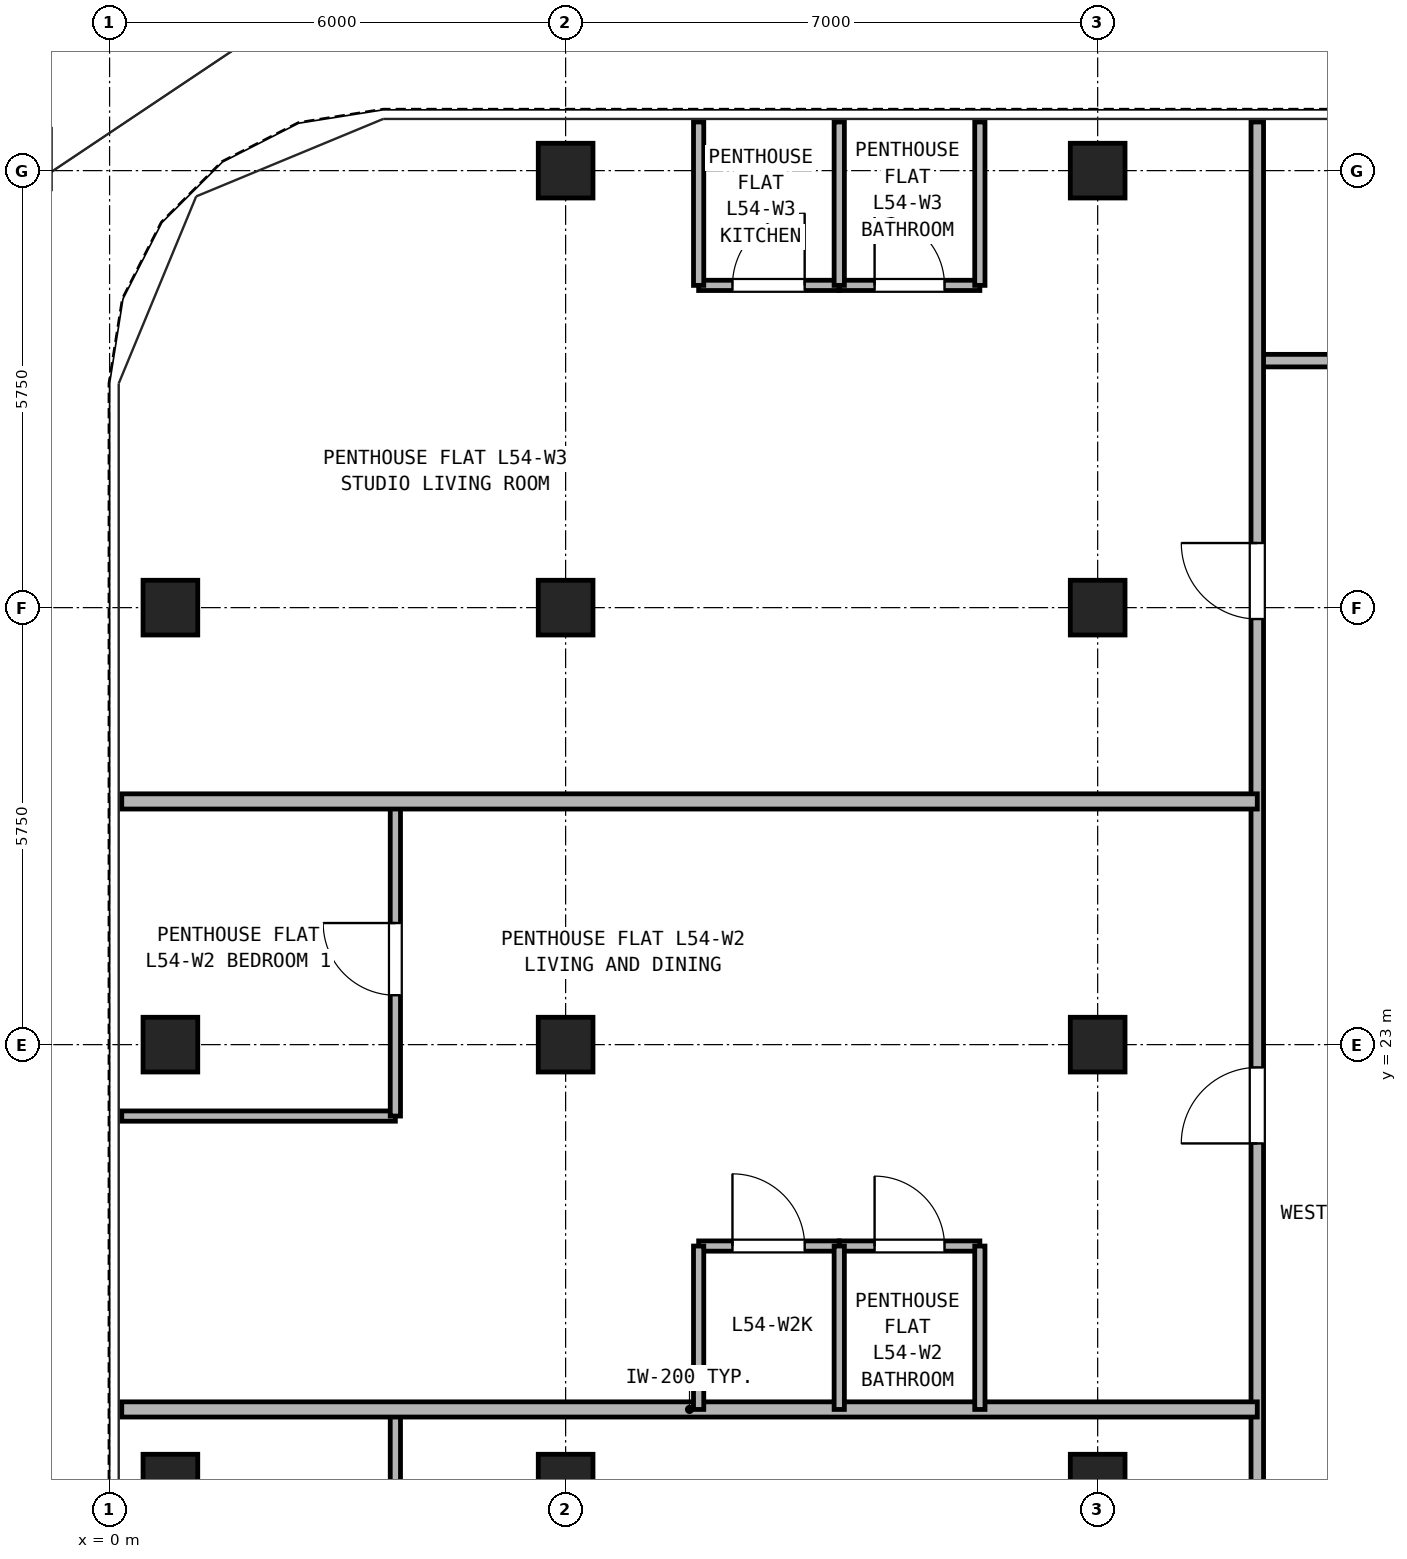
"""IFC4 building model, lengths in metres.
Left out: names, types, materials, properties, quantities, classifications, styles, units other than length and angle.
Written with IfcOpenShell. Run it as: python <this file> out.ifc"""

import sys

from ifc_helpers import new_model, si_unit, direction, frame, frame_2d, origin, origin_2d, place, context, subcontext, project, spatial, rectangle, hollow_rectangle, extrude, source, transform, mapped, element, fill, save


model = new_model("IFC4")
c1 = context("Model", 3, precision=1e-05, world=origin(), true_north=direction((0.0, 1.0)))
c2 = subcontext(c1, "Body", "Model", "MODEL_VIEW")
j1 = project(units=[si_unit("LENGTHUNIT", "METRE"), si_unit("PLANEANGLEUNIT", "RADIAN")], contexts=[c1])
p1 = place(None, origin())
s1 = spatial("IfcSite", under=j1, at=p1, CompositionType="ELEMENT")
p2 = place(p1, origin())
s2 = spatial("IfcBuilding", under=s1, at=p2, CompositionType="ELEMENT")
p3 = place(p2, frame((0.0, 0.0, 193.2)))
s3 = spatial("IfcBuildingStorey", under=s2, at=p3, CompositionType="ELEMENT", Elevation=193.2)
m1 = source(origin(), c2, "Body", "SweptSolid", [
    extrude(hollow_rectangle(XDim=0.72, YDim=0.72, WallThickness=0.04, at=origin_2d()), origin(), (0.0, 0.0, 1.0), 2.95),
])
for number, where, z_axis, x_axis in (
    (1, (6.0, 34.5, 0.0), (0.0, 0.0, 1.0), (1.0, 0.0, 0.0)),
    (2, (13.0, 34.5, 0.0), (0.0, 0.0, 1.0), (1.0, 0.0, 0.0)),
    (3, (0.8, 17.25, 0.0), (0.0, 0.0, 1.0), (1.0, 0.0, 0.0)),
    (4, (0.8, 23.0, 0.0), (0.0, 0.0, 1.0), (1.0, 0.0, 0.0)),
    (5, (0.8, 28.75, 0.0), (0.0, 0.0, 1.0), (1.0, 0.0, 0.0)),
    (6, (6.0, 17.25, 0.0), (0.0, 0.0, 1.0), (1.0, 0.0, 0.0)),
    (7, (6.0, 23.0, 0.0), (0.0, 0.0, 1.0), (1.0, 0.0, 0.0)),
    (8, (6.0, 28.75, 0.0), (0.0, 0.0, 1.0), (1.0, 0.0, 0.0)),
    (9, (13.0, 17.25, 0.0), (0.0, 0.0, 1.0), (1.0, 0.0, 0.0)),
    (10, (13.0, 23.0, 0.0), (0.0, 0.0, 1.0), (1.0, 0.0, 0.0)),
    (11, (13.0, 28.75, 0.0), (0.0, 0.0, 1.0), (1.0, 0.0, 0.0)),
):
    element("IfcColumn", number, at=place(p3, frame(where, z_axis=z_axis, x_axis=x_axis)), inside=s3, PredefinedType="COLUMN", context=c2, shape_type="MappedRepresentation", body=[
        mapped(m1, transform((0.0, 0.0, 0.0), x_axis=(1.0, 0.0, 0.0), y_axis=(0.0, 1.0, 0.0), z_axis=(0.0, 0.0, 1.0), scale=1.0)),
    ])
p4 = place(p3, frame((15.1, 32.0, 0.0), z_axis=(0.0, 0.0, 1.0), x_axis=(1.0, 0.0, 0.0)))
e12 = element("IfcWall", 12, at=p4, inside=s3, PredefinedType="PARTITIONING", context=c2, shape_type="SweptSolid", body=[
    extrude(rectangle(XDim=16.8, YDim=0.165, at=frame_2d((8.4, 0.0))), origin(), (0.0, 0.0, 1.0), 2.95),
])
p5 = place(p4, frame((2.7, 0.0, 0.0)))
e13 = element("IfcOpeningElement", 13, at=p5, cuts=e12, PredefinedType="OPENING", context=c2, shape_type="SweptSolid", body=[
    extrude(rectangle(XDim=0.95, YDim=2.15, at=frame_2d((0.475, 1.075))), frame((0.0, 0.093, 0.0), z_axis=(0.0, -1.0, 0.0), x_axis=(1.0, 0.0, 0.0)), (0.0, 0.0, 1.0), 0.185),
])
p6 = place(p4, frame((8.1, 0.0, 0.0)))
e14 = element("IfcOpeningElement", 14, at=p6, cuts=e12, PredefinedType="OPENING", context=c2, shape_type="SweptSolid", body=[
    extrude(rectangle(XDim=0.95, YDim=2.15, at=frame_2d((0.475, 1.075))), frame((0.0, 0.093, 0.0), z_axis=(0.0, -1.0, 0.0), x_axis=(1.0, 0.0, 0.0)), (0.0, 0.0, 1.0), 0.185),
])
p7 = place(p4, frame((13.3, 0.0, 0.0)))
e15 = element("IfcOpeningElement", 15, at=p7, cuts=e12, PredefinedType="OPENING", context=c2, shape_type="SweptSolid", body=[
    extrude(rectangle(XDim=0.92, YDim=2.1, at=frame_2d((0.46, 1.05))), frame((0.0, 0.093, 0.0), z_axis=(0.0, -1.0, 0.0), x_axis=(1.0, 0.0, 0.0)), (0.0, 0.0, 1.0), 0.185),
])
p8 = place(p3, frame((15.1, 10.6, 0.0), z_axis=(0.0, 0.0, 1.0), x_axis=(0.0, 1.0, 0.0)))
e16 = element("IfcWall", 16, at=p8, inside=s3, PredefinedType="PARTITIONING", context=c2, shape_type="SweptSolid", body=[
    extrude(rectangle(XDim=24.54, YDim=0.165, at=frame_2d((12.27, 0.0))), origin(), (0.0, 0.0, 1.0), 2.95),
])
p9 = place(p8, frame((3.3, 0.0, 0.0)))
e17 = element("IfcOpeningElement", 17, at=p9, cuts=e16, PredefinedType="OPENING", context=c2, shape_type="SweptSolid", body=[
    extrude(rectangle(XDim=1.0, YDim=2.15, at=frame_2d((0.5, 1.075))), frame((0.0, 0.093, 0.0), z_axis=(0.0, -1.0, 0.0), x_axis=(1.0, 0.0, 0.0)), (0.0, 0.0, 1.0), 0.185),
])
p10 = place(p8, frame((11.1, 0.0, 0.0)))
e18 = element("IfcOpeningElement", 18, at=p10, cuts=e16, PredefinedType="OPENING", context=c2, shape_type="SweptSolid", body=[
    extrude(rectangle(XDim=1.0, YDim=2.15, at=frame_2d((0.5, 1.075))), frame((0.0, 0.093, 0.0), z_axis=(0.0, -1.0, 0.0), x_axis=(1.0, 0.0, 0.0)), (0.0, 0.0, 1.0), 0.185),
])
p11 = place(p8, frame((18.0, 0.0, 0.0)))
e19 = element("IfcOpeningElement", 19, at=p11, cuts=e16, PredefinedType="OPENING", context=c2, shape_type="SweptSolid", body=[
    extrude(rectangle(XDim=1.0, YDim=2.15, at=frame_2d((0.5, 1.075))), frame((0.0, 0.093, 0.0), z_axis=(0.0, -1.0, 0.0), x_axis=(1.0, 0.0, 0.0)), (0.0, 0.0, 1.0), 0.185),
])
p12 = place(p3, frame((3.76, 14.348, 0.0), z_axis=(0.0, 0.0, 1.0), x_axis=(0.0, 1.0, 0.0)))
e20 = element("IfcWall", 20, at=p12, inside=s3, PredefinedType="PARTITIONING", context=c2, shape_type="SweptSolid", body=[
    extrude(rectangle(XDim=3.852, YDim=0.135, at=frame_2d((1.926, 0.0))), origin(), (0.0, 0.0, 1.0), 2.95),
])
p13 = place(p12, frame((1.446, 0.0, 0.0)))
e21 = element("IfcOpeningElement", 21, at=p13, cuts=e20, PredefinedType="OPENING", context=c2, shape_type="SweptSolid", body=[
    extrude(rectangle(XDim=0.95, YDim=2.15, at=frame_2d((0.475, 1.075))), frame((0.0, 0.077, 0.0), z_axis=(0.0, -1.0, 0.0), x_axis=(1.0, 0.0, 0.0)), (0.0, 0.0, 1.0), 0.155),
])
p14 = place(p3, frame((0.16, 18.2, 0.0), z_axis=(0.0, 0.0, 1.0), x_axis=(1.0, 0.0, 0.0)))
e22 = element("IfcWall", 22, at=p14, inside=s3, PredefinedType="PARTITIONING", context=c2, shape_type="SweptSolid", body=[
    extrude(rectangle(XDim=14.94, YDim=0.2, at=frame_2d((7.47, 0.0))), origin(), (0.0, 0.0, 1.0), 2.95),
])
p15 = place(p3, frame((7.75, 20.35, 0.0), z_axis=(0.0, 0.0, 1.0), x_axis=(1.0, 0.0, 0.0)))
e23 = element("IfcWall", 23, at=p15, inside=s3, PredefinedType="PARTITIONING", context=c2, shape_type="SweptSolid", body=[
    extrude(rectangle(XDim=1.85, YDim=0.135, at=frame_2d((0.925, 0.0))), origin(), (0.0, 0.0, 1.0), 2.583),
])
p16 = place(p15, frame((0.445, 0.0, 0.0)))
e24 = element("IfcOpeningElement", 24, at=p16, cuts=e23, PredefinedType="OPENING", context=c2, shape_type="SweptSolid", body=[
    extrude(rectangle(XDim=0.95, YDim=2.15, at=frame_2d((0.475, 1.075))), frame((0.0, 0.077, 0.0), z_axis=(0.0, -1.0, 0.0), x_axis=(1.0, 0.0, 0.0)), (0.0, 0.0, 1.0), 0.155),
])
p17 = place(p3, frame((9.6, 20.35, 0.0), z_axis=(0.0, 0.0, 1.0), x_axis=(1.0, 0.0, 0.0)))
e25 = element("IfcWall", 25, at=p17, inside=s3, PredefinedType="PARTITIONING", context=c2, shape_type="SweptSolid", body=[
    extrude(rectangle(XDim=1.85, YDim=0.135, at=frame_2d((0.925, 0.0))), origin(), (0.0, 0.0, 1.0), 2.583),
])
p18 = place(p17, frame((0.465, 0.0, 0.0)))
e26 = element("IfcOpeningElement", 26, at=p18, cuts=e25, PredefinedType="OPENING", context=c2, shape_type="SweptSolid", body=[
    extrude(rectangle(XDim=0.92, YDim=2.1, at=frame_2d((0.46, 1.05))), frame((0.0, 0.077, 0.0), z_axis=(0.0, -1.0, 0.0), x_axis=(1.0, 0.0, 0.0)), (0.0, 0.0, 1.0), 0.155),
])
for number, where, z_axis, x_axis in (
    (27, (7.75, 18.2, 0.0), (0.0, 0.0, 1.0), (0.0, 1.0, 0.0)),
    (28, (9.6, 18.2, 0.0), (0.0, 0.0, 1.0), (0.0, 1.0, 0.0)),
    (29, (11.45, 18.2, 0.0), (0.0, 0.0, 1.0), (0.0, 1.0, 0.0)),
):
    element("IfcWall", number, at=place(p3, frame(where, z_axis=z_axis, x_axis=x_axis)), inside=s3, PredefinedType="PARTITIONING", context=c2, shape_type="SweptSolid", body=[
        extrude(rectangle(XDim=2.15, YDim=0.135, at=frame_2d((1.075, 0.0))), origin(), (0.0, 0.0, 1.0), 2.95),
    ])
p19 = place(p3, frame((0.16, 22.06, 0.0), z_axis=(0.0, 0.0, 1.0), x_axis=(1.0, 0.0, 0.0)))
e30 = element("IfcWall", 30, at=p19, inside=s3, PredefinedType="PARTITIONING", context=c2, shape_type="SweptSolid", body=[
    extrude(rectangle(XDim=3.6, YDim=0.135, at=frame_2d((1.8, 0.0))), origin(), (0.0, 0.0, 1.0), 2.95),
])
p20 = place(p3, frame((3.76, 22.06, 0.0), z_axis=(0.0, 0.0, 1.0), x_axis=(0.0, 1.0, 0.0)))
e31 = element("IfcWall", 31, at=p20, inside=s3, PredefinedType="PARTITIONING", context=c2, shape_type="SweptSolid", body=[
    extrude(rectangle(XDim=4.14, YDim=0.135, at=frame_2d((2.07, 0.0))), origin(), (0.0, 0.0, 1.0), 2.95),
])
p21 = place(p20, frame((1.59, 0.0, 0.0)))
e32 = element("IfcOpeningElement", 32, at=p21, cuts=e31, PredefinedType="OPENING", context=c2, shape_type="SweptSolid", body=[
    extrude(rectangle(XDim=0.95, YDim=2.15, at=frame_2d((0.475, 1.075))), frame((0.0, 0.077, 0.0), z_axis=(0.0, -1.0, 0.0), x_axis=(1.0, 0.0, 0.0)), (0.0, 0.0, 1.0), 0.155),
])
p22 = place(p3, frame((0.16, 26.2, 0.0), z_axis=(0.0, 0.0, 1.0), x_axis=(1.0, 0.0, 0.0)))
e33 = element("IfcWall", 33, at=p22, inside=s3, PredefinedType="PARTITIONING", context=c2, shape_type="SweptSolid", body=[
    extrude(rectangle(XDim=14.94, YDim=0.2, at=frame_2d((7.47, 0.0))), origin(), (0.0, 0.0, 1.0), 2.95),
])
p23 = place(p3, frame((7.75, 32.99, 0.0), z_axis=(0.0, 0.0, 1.0), x_axis=(1.0, 0.0, 0.0)))
e34 = element("IfcWall", 34, at=p23, inside=s3, PredefinedType="PARTITIONING", context=c2, shape_type="SweptSolid", body=[
    extrude(rectangle(XDim=1.85, YDim=0.135, at=frame_2d((0.925, 0.0))), origin(), (0.0, 0.0, 1.0), 2.95),
])
p24 = place(p23, frame((0.445, 0.0, 0.0)))
e35 = element("IfcOpeningElement", 35, at=p24, cuts=e34, PredefinedType="OPENING", context=c2, shape_type="SweptSolid", body=[
    extrude(rectangle(XDim=0.95, YDim=2.15, at=frame_2d((0.475, 1.075))), frame((0.0, 0.077, 0.0), z_axis=(0.0, -1.0, 0.0), x_axis=(1.0, 0.0, 0.0)), (0.0, 0.0, 1.0), 0.155),
])
p25 = place(p3, frame((9.6, 32.99, 0.0), z_axis=(0.0, 0.0, 1.0), x_axis=(1.0, 0.0, 0.0)))
e36 = element("IfcWall", 36, at=p25, inside=s3, PredefinedType="PARTITIONING", context=c2, shape_type="SweptSolid", body=[
    extrude(rectangle(XDim=1.85, YDim=0.135, at=frame_2d((0.925, 0.0))), origin(), (0.0, 0.0, 1.0), 2.95),
])
p26 = place(p25, frame((0.465, 0.0, 0.0)))
e37 = element("IfcOpeningElement", 37, at=p26, cuts=e36, PredefinedType="OPENING", context=c2, shape_type="SweptSolid", body=[
    extrude(rectangle(XDim=0.92, YDim=2.1, at=frame_2d((0.46, 1.05))), frame((0.0, 0.077, 0.0), z_axis=(0.0, -1.0, 0.0), x_axis=(1.0, 0.0, 0.0)), (0.0, 0.0, 1.0), 0.155),
])
for number, where, z_axis, x_axis in (
    (38, (7.75, 32.99, 0.0), (0.0, 0.0, 1.0), (0.0, 1.0, 0.0)),
    (39, (9.6, 32.99, 0.0), (0.0, 0.0, 1.0), (0.0, 1.0, 0.0)),
    (40, (11.45, 32.99, 0.0), (0.0, 0.0, 1.0), (0.0, 1.0, 0.0)),
):
    element("IfcWall", number, at=place(p3, frame(where, z_axis=z_axis, x_axis=x_axis)), inside=s3, PredefinedType="PARTITIONING", context=c2, shape_type="SweptSolid", body=[
        extrude(rectangle(XDim=2.15, YDim=0.135, at=frame_2d((1.075, 0.0))), origin(), (0.0, 0.0, 1.0), 2.95),
    ])
p27 = place(p16, origin())
e41 = element("IfcDoor", 41, at=p27, inside=s3, OperationType="SINGLE_SWING_LEFT", PredefinedType="DOOR", context=c2, shape_type="SweptSolid", body=[
    extrude(rectangle(XDim=0.95, YDim=2.15, at=frame_2d((0.475, 1.075))), frame((0.0, 0.025, 0.0), z_axis=(0.0, -1.0, 0.0), x_axis=(1.0, 0.0, 0.0)), (0.0, 0.0, 1.0), 0.05),
])
fill(e24, e41)
p28 = place(p18, origin())
e42 = element("IfcDoor", 42, at=p28, inside=s3, OperationType="SINGLE_SWING_LEFT", PredefinedType="DOOR", context=c2, shape_type="SweptSolid", body=[
    extrude(rectangle(XDim=0.92, YDim=2.1, at=frame_2d((0.46, 1.05))), frame((0.0, 0.025, 0.0), z_axis=(0.0, -1.0, 0.0), x_axis=(1.0, 0.0, 0.0)), (0.0, 0.0, 1.0), 0.05),
])
fill(e26, e42)
p29 = place(p21, origin())
e43 = element("IfcDoor", 43, at=p29, inside=s3, OperationType="SINGLE_SWING_RIGHT", PredefinedType="DOOR", context=c2, shape_type="SweptSolid", body=[
    extrude(rectangle(XDim=0.95, YDim=2.15, at=frame_2d((0.475, 1.075))), frame((0.0, 0.025, 0.0), z_axis=(0.0, -1.0, 0.0), x_axis=(1.0, 0.0, 0.0)), (0.0, 0.0, 1.0), 0.05),
])
fill(e32, e43)
p30 = place(p10, origin())
e44 = element("IfcDoor", 44, at=p30, inside=s3, OperationType="SINGLE_SWING_LEFT", PredefinedType="DOOR", context=c2, shape_type="SweptSolid", body=[
    extrude(rectangle(XDim=1.0, YDim=2.15, at=frame_2d((0.5, 1.075))), frame((0.0, 0.025, 0.0), z_axis=(0.0, -1.0, 0.0), x_axis=(1.0, 0.0, 0.0)), (0.0, 0.0, 1.0), 0.05),
])
fill(e18, e44)
p31 = place(p24, frame((0.95, 0.0, 0.0), z_axis=(0.0, 0.0, 1.0), x_axis=(-1.0, 0.0, 0.0)))
e45 = element("IfcDoor", 45, at=p31, inside=s3, OperationType="SINGLE_SWING_RIGHT", PredefinedType="DOOR", context=c2, shape_type="SweptSolid", body=[
    extrude(rectangle(XDim=0.95, YDim=2.15, at=frame_2d((0.475, 1.075))), frame((0.0, 0.025, 0.0), z_axis=(0.0, -1.0, 0.0), x_axis=(1.0, 0.0, 0.0)), (0.0, 0.0, 1.0), 0.05),
])
fill(e35, e45)
p32 = place(p26, frame((0.92, 0.0, 0.0), z_axis=(0.0, 0.0, 1.0), x_axis=(-1.0, 0.0, 0.0)))
e46 = element("IfcDoor", 46, at=p32, inside=s3, OperationType="SINGLE_SWING_LEFT", PredefinedType="DOOR", context=c2, shape_type="SweptSolid", body=[
    extrude(rectangle(XDim=0.92, YDim=2.1, at=frame_2d((0.46, 1.05))), frame((0.0, 0.025, 0.0), z_axis=(0.0, -1.0, 0.0), x_axis=(1.0, 0.0, 0.0)), (0.0, 0.0, 1.0), 0.05),
])
fill(e37, e46)
p33 = place(p11, origin())
e47 = element("IfcDoor", 47, at=p33, inside=s3, OperationType="SINGLE_SWING_RIGHT", PredefinedType="DOOR", context=c2, shape_type="SweptSolid", body=[
    extrude(rectangle(XDim=1.0, YDim=2.15, at=frame_2d((0.5, 1.075))), frame((0.0, 0.025, 0.0), z_axis=(0.0, -1.0, 0.0), x_axis=(1.0, 0.0, 0.0)), (0.0, 0.0, 1.0), 0.05),
])
fill(e19, e47)
save(model, sys.argv[1])
